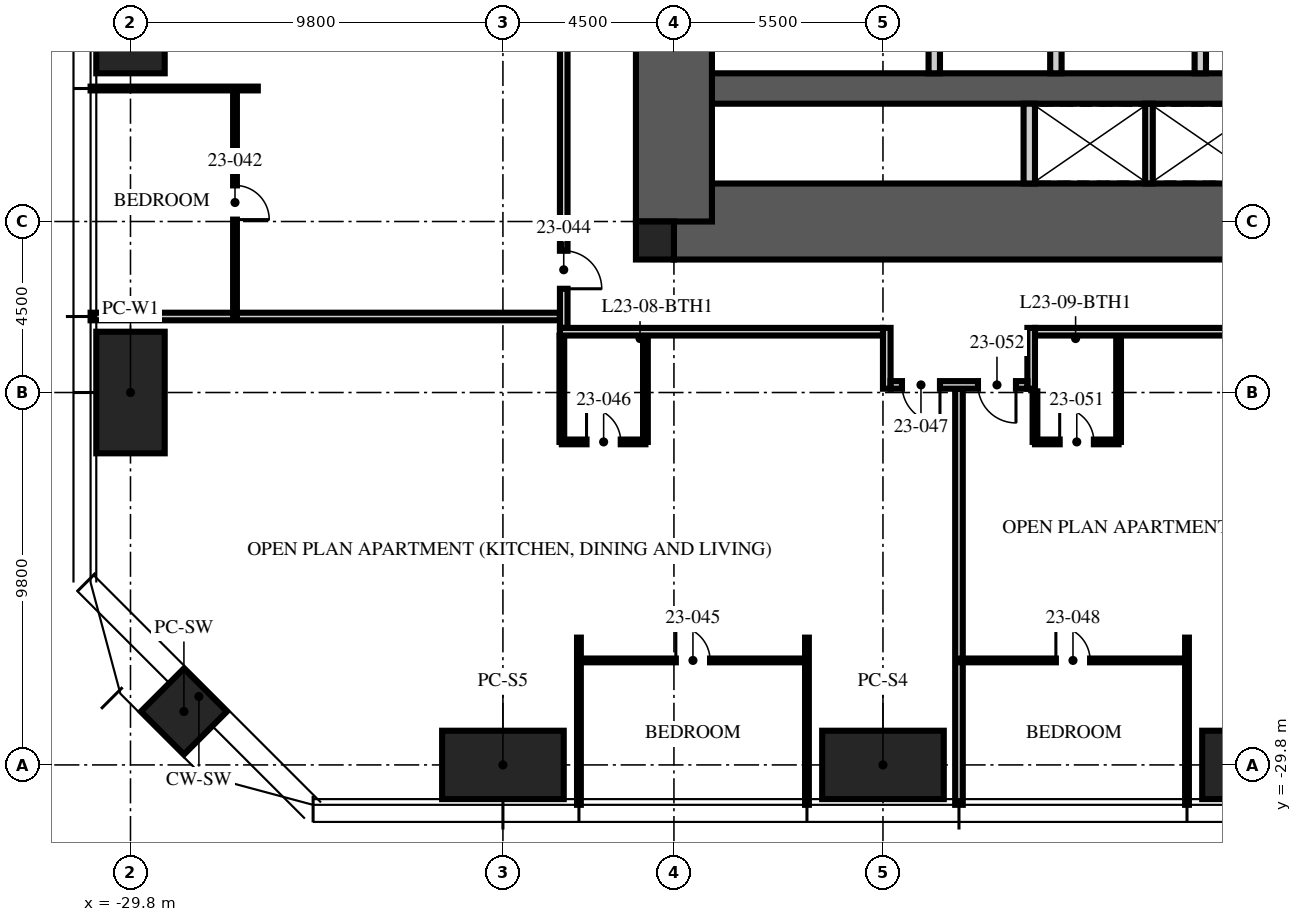
"""IFC4 building model, lengths in metres.
Left out: names, types, materials, properties, quantities, classifications, styles, units other than length and angle.
Written with IfcOpenShell. Run it as: python <this file> out.ifc"""

import sys

from ifc_helpers import new_model, si_unit, direction, frame, frame_2d, origin, origin_2d, place, context, subcontext, project, spatial, rectangle, hollow_rectangle, extrude, element, fill, save


model = new_model("IFC4")
c1 = context("Model", 3, precision=1e-05, world=origin(), true_north=direction((0.0, 1.0)))
c2 = subcontext(c1, "Body", "Model", "MODEL_VIEW")
j1 = project(units=[si_unit("LENGTHUNIT", "METRE"), si_unit("PLANEANGLEUNIT", "RADIAN")], contexts=[c1])
p1 = place(None, origin())
s1 = spatial("IfcSite", under=j1, at=p1, CompositionType="ELEMENT")
p2 = place(p1, origin())
s2 = spatial("IfcBuilding", under=s1, at=p2, CompositionType="ELEMENT")
p3 = place(p2, frame((0.0, 0.0, 92.25)))
s3 = spatial("IfcBuildingStorey", under=s2, at=p3, CompositionType="ELEMENT", Elevation=92.25)
p4 = place(p3, frame((-15.5, -15.5, -0.25), z_axis=(0.0, 0.0, 1.0), x_axis=(1.0, 0.0, 0.0)))
e1 = element("IfcWall", 1, at=p4, inside=s3, PredefinedType="SHEAR", context=c2, shape_type="SweptSolid", body=[
    extrude(rectangle(XDim=31.0, YDim=2.0, at=frame_2d((15.5, 0.0))), origin(), (0.0, 0.0, 1.0), 3.75),
])
p5 = place(p3, frame((-15.5, -12.0, -0.25), z_axis=(0.0, 0.0, 1.0), x_axis=(1.0, 0.0, 0.0)))
e2 = element("IfcWall", 2, at=p5, inside=s3, PredefinedType="SHEAR", context=c2, shape_type="SweptSolid", body=[
    extrude(rectangle(XDim=31.0, YDim=0.8, at=frame_2d((15.5, 0.0))), origin(), (0.0, 0.0, 1.0), 3.75),
])
p6 = place(p3, frame((-15.5, -15.5, -0.25), z_axis=(0.0, 0.0, 1.0), x_axis=(0.0, 1.0, 0.0)))
e3 = element("IfcWall", 3, at=p6, inside=s3, PredefinedType="SHEAR", context=c2, shape_type="SweptSolid", body=[
    extrude(rectangle(XDim=31.0, YDim=2.0, at=frame_2d((15.5, 0.0))), origin(), (0.0, 0.0, 1.0), 3.75),
])
p7 = place(p6, frame((6.5, 0.0, 0.25)))
e4 = element("IfcOpeningElement", 4, at=p7, cuts=e3, PredefinedType="OPENING", context=c2, shape_type="SweptSolid", body=[
    extrude(rectangle(XDim=1.2, YDim=2.1, at=frame_2d((0.6, 1.05))), frame((0.0, 1.01, 0.0), z_axis=(0.0, -1.0, 0.0), x_axis=(1.0, 0.0, 0.0)), (0.0, 0.0, 1.0), 2.02),
])
p8 = place(p6, frame((23.0, 0.0, 0.25)))
e5 = element("IfcOpeningElement", 5, at=p8, cuts=e3, PredefinedType="OPENING", context=c2, shape_type="SweptSolid", body=[
    extrude(rectangle(XDim=1.8, YDim=2.1, at=frame_2d((0.9, 1.05))), frame((0.0, 1.01, 0.0), z_axis=(0.0, -1.0, 0.0), x_axis=(1.0, 0.0, 0.0)), (0.0, 0.0, 1.0), 2.02),
])
p9 = place(p3, frame((-16.0, -16.0, -0.25), z_axis=(0.0, 0.0, 1.0), x_axis=(1.0, 0.0, 0.0)))
e6 = element("IfcColumn", 6, at=p9, inside=s3, PredefinedType="COLUMN", context=c2, shape_type="SweptSolid", body=[
    extrude(rectangle(XDim=1.0, YDim=1.0, at=origin_2d()), origin(), (0.0, 0.0, 1.0), 3.75),
])
for number, where, z_axis, x_axis in (
    (7, (0.0, -29.8, 0.0), (0.0, 0.0, 1.0), (1.0, 0.0, 0.0)),
    (8, (-10.0, -29.8, 0.0), (0.0, 0.0, 1.0), (1.0, 0.0, 0.0)),
    (9, (-20.0, -29.8, 0.0), (0.0, 0.0, 1.0), (1.0, 0.0, 0.0)),
    (10, (-29.8, -20.0, 0.0), (0.0, 0.0, 1.0), (0.0, 1.0, 0.0)),
    (11, (-29.8, -10.0, 0.0), (0.0, 0.0, 1.0), (0.0, 1.0, 0.0)),
):
    element("IfcColumn", number, at=place(p3, frame(where, z_axis=z_axis, x_axis=x_axis)), inside=s3, PredefinedType="COLUMN", context=c2, shape_type="SweptSolid", body=[
        extrude(hollow_rectangle(XDim=3.2, YDim=1.8, WallThickness=0.2, at=origin_2d()), origin(), (0.0, 0.0, 1.0), 3.75),
    ])
p10 = place(p3, frame((-28.394, -28.394, 0.0), z_axis=(0.0, 0.0, 1.0), x_axis=(0.707106781187, -0.707106781187, 0.0)))
e12 = element("IfcColumn", 12, at=p10, inside=s3, PredefinedType="COLUMN", context=c2, shape_type="SweptSolid", body=[
    extrude(hollow_rectangle(XDim=1.6, YDim=1.6, WallThickness=0.1, at=origin_2d()), origin(), (0.0, 0.0, 1.0), 3.75),
])
p11 = place(p3, frame((-8.65, -11.6, 0.0), z_axis=(0.0, 0.0, 1.0), x_axis=(0.0, 1.0, 0.0)))
e13 = element("IfcWall", 13, at=p11, inside=s3, PredefinedType="PARTITIONING", context=c2, shape_type="SweptSolid", body=[
    extrude(rectangle(XDim=6.7, YDim=0.3, at=frame_2d((3.35, 0.0))), origin(), (0.0, 0.0, 1.0), 3.5),
])
p12 = place(p11, frame((2.85, 0.0, 0.0)))
e14 = element("IfcOpeningElement", 14, at=p12, cuts=e13, PredefinedType="OPENING", context=c2, shape_type="SweptSolid", body=[
    extrude(rectangle(XDim=1.1, YDim=2.1, at=frame_2d((0.55, 1.05))), frame((0.0, 0.16, 0.0), z_axis=(0.0, -1.0, 0.0), x_axis=(1.0, 0.0, 0.0)), (0.0, 0.0, 1.0), 0.32),
])
for number, where, z_axis, x_axis in (
    (15, (-5.45, -11.6, 0.0), (0.0, 0.0, 1.0), (0.0, 1.0, 0.0)),
    (16, (-1.65, -11.6, 0.0), (0.0, 0.0, 1.0), (0.0, 1.0, 0.0)),
):
    element("IfcWall", number, at=place(p3, frame(where, z_axis=z_axis, x_axis=x_axis)), inside=s3, PredefinedType="PARTITIONING", context=c2, shape_type="SweptSolid", body=[
        extrude(rectangle(XDim=4.8, YDim=0.3, at=frame_2d((2.4, 0.0))), origin(), (0.0, 0.0, 1.0), 3.5),
    ])
p13 = place(p3, frame((-6.15, -14.5, 0.0), z_axis=(0.0, 0.0, 1.0), x_axis=(0.0, 1.0, 0.0)))
e17 = element("IfcWall", 17, at=p13, inside=s3, PredefinedType="PARTITIONING", context=c2, shape_type="SweptSolid", body=[
    extrude(rectangle(XDim=2.1, YDim=0.3, at=frame_2d((1.05, 0.0))), origin(), (0.0, 0.0, 1.0), 3.5),
])
p14 = place(p3, frame((-3.0, -14.5, 0.0), z_axis=(0.0, 0.0, 1.0), x_axis=(0.0, 1.0, 0.0)))
e18 = element("IfcWall", 18, at=p14, inside=s3, PredefinedType="PARTITIONING", context=c2, shape_type="SweptSolid", body=[
    extrude(rectangle(XDim=2.1, YDim=0.2, at=frame_2d((1.05, 0.0))), origin(), (0.0, 0.0, 1.0), 3.5),
])
p15 = place(p3, frame((-26.45, -12.0, 0.0), z_axis=(0.0, 0.0, 1.0), x_axis=(-1.0, 0.0, 0.0)))
e19 = element("IfcWall", 19, at=p15, inside=s3, PredefinedType="PARTITIONING", context=c2, shape_type="SweptSolid", body=[
    extrude(rectangle(XDim=4.4, YDim=0.1, at=frame_2d((2.2, 0.0))), origin(), (0.0, 0.0, 1.0), 2.61),
])
p16 = place(p3, frame((-18.5, -18.0, 0.0), z_axis=(0.0, 0.0, 1.0), x_axis=(-1.0, 0.0, 0.0)))
e20 = element("IfcWall", 20, at=p16, inside=s3, PredefinedType="PARTITIONING", context=c2, shape_type="SweptSolid", body=[
    extrude(rectangle(XDim=12.35, YDim=0.2, at=frame_2d((6.175, 0.0))), origin(), (0.0, 0.0, 1.0), 2.3),
])
for number, where, z_axis, x_axis in (
    (21, (-18.0, -26.45, 0.0), (0.0, 0.0, 1.0), (0.0, -1.0, 0.0)),
    (22, (-12.0, -26.45, 0.0), (0.0, 0.0, 1.0), (0.0, -1.0, 0.0)),
):
    element("IfcWall", number, at=place(p3, frame(where, z_axis=z_axis, x_axis=x_axis)), inside=s3, PredefinedType="PARTITIONING", context=c2, shape_type="SweptSolid", body=[
        extrude(rectangle(XDim=4.4, YDim=0.1, at=frame_2d((2.2, 0.0))), origin(), (0.0, 0.0, 1.0), 2.61),
    ])
p17 = place(p3, frame((-8.0, -19.9, 0.0), z_axis=(0.0, 0.0, 1.0), x_axis=(0.0, -1.0, 0.0)))
e23 = element("IfcWall", 23, at=p17, inside=s3, PredefinedType="PARTITIONING", context=c2, shape_type="SweptSolid", body=[
    extrude(rectangle(XDim=10.95, YDim=0.2, at=frame_2d((5.475, 0.0))), origin(), (0.0, 0.0, 1.0), 2.61),
])
p18 = place(p3, frame((-2.0, -26.45, 0.0), z_axis=(0.0, 0.0, 1.0), x_axis=(0.0, -1.0, 0.0)))
e24 = element("IfcWall", 24, at=p18, inside=s3, PredefinedType="PARTITIONING", context=c2, shape_type="SweptSolid", body=[
    extrude(rectangle(XDim=4.4, YDim=0.1, at=frame_2d((2.2, 0.0))), origin(), (0.0, 0.0, 1.0), 2.61),
])
p19 = place(p3, frame((-27.05, -12.0, 0.0), z_axis=(0.0, 0.0, 1.0), x_axis=(0.0, -1.0, 0.0)))
e25 = element("IfcWall", 25, at=p19, inside=s3, PredefinedType="PARTITIONING", context=c2, shape_type="SweptSolid", body=[
    extrude(rectangle(XDim=6.0, YDim=0.1, at=frame_2d((3.0, 0.0))), origin(), (0.0, 0.0, 1.0), 2.6),
])
p20 = place(p19, frame((2.55, 0.0, 0.0)))
e26 = element("IfcOpeningElement", 26, at=p20, cuts=e25, PredefinedType="OPENING", context=c2, shape_type="SweptSolid", body=[
    extrude(rectangle(XDim=0.9, YDim=2.1, at=frame_2d((0.45, 1.05))), frame((0.0, 0.06, 0.0), z_axis=(0.0, -1.0, 0.0), x_axis=(1.0, 0.0, 0.0)), (0.0, 0.0, 1.0), 0.12),
])
p21 = place(p3, frame((-18.0, -27.05, 0.0), z_axis=(0.0, 0.0, 1.0), x_axis=(1.0, 0.0, 0.0)))
e27 = element("IfcWall", 27, at=p21, inside=s3, PredefinedType="PARTITIONING", context=c2, shape_type="SweptSolid", body=[
    extrude(rectangle(XDim=6.0, YDim=0.1, at=frame_2d((3.0, 0.0))), origin(), (0.0, 0.0, 1.0), 2.6),
])
p22 = place(p21, frame((2.55, 0.0, 0.0)))
e28 = element("IfcOpeningElement", 28, at=p22, cuts=e27, PredefinedType="OPENING", context=c2, shape_type="SweptSolid", body=[
    extrude(rectangle(XDim=0.9, YDim=2.1, at=frame_2d((0.45, 1.05))), frame((0.0, 0.06, 0.0), z_axis=(0.0, -1.0, 0.0), x_axis=(1.0, 0.0, 0.0)), (0.0, 0.0, 1.0), 0.12),
])
p23 = place(p3, frame((-18.45, -21.3, 0.0), z_axis=(0.0, 0.0, 1.0), x_axis=(1.0, 0.0, 0.0)))
e29 = element("IfcWall", 29, at=p23, inside=s3, PredefinedType="PARTITIONING", context=c2, shape_type="SweptSolid", body=[
    extrude(rectangle(XDim=2.2, YDim=0.125, at=frame_2d((1.1, 0.0))), origin(), (0.0, 0.0, 1.0), 3.5),
])
p24 = place(p23, frame((0.65, 0.0, 0.0)))
e30 = element("IfcOpeningElement", 30, at=p24, cuts=e29, PredefinedType="OPENING", context=c2, shape_type="SweptSolid", body=[
    extrude(rectangle(XDim=0.9, YDim=2.1, at=frame_2d((0.45, 1.05))), frame((0.0, 0.073, 0.0), z_axis=(0.0, -1.0, 0.0), x_axis=(1.0, 0.0, 0.0)), (0.0, 0.0, 1.0), 0.145),
])
p25 = place(p3, frame((-18.45, -18.5, 0.0), z_axis=(0.0, 0.0, 1.0), x_axis=(0.0, -1.0, 0.0)))
e31 = element("IfcWall", 31, at=p25, inside=s3, PredefinedType="PARTITIONING", context=c2, shape_type="SweptSolid", body=[
    extrude(rectangle(XDim=2.8, YDim=0.125, at=frame_2d((1.4, 0.0))), origin(), (0.0, 0.0, 1.0), 2.3),
])
p26 = place(p3, frame((-16.25, -18.5, 0.0), z_axis=(0.0, 0.0, 1.0), x_axis=(0.0, -1.0, 0.0)))
e32 = element("IfcWall", 32, at=p26, inside=s3, PredefinedType="PARTITIONING", context=c2, shape_type="SweptSolid", body=[
    extrude(rectangle(XDim=2.8, YDim=0.125, at=frame_2d((1.4, 0.0))), origin(), (0.0, 0.0, 1.0), 3.5),
])
p27 = place(p3, frame((-8.0, -27.05, 0.0), z_axis=(0.0, 0.0, 1.0), x_axis=(1.0, 0.0, 0.0)))
e33 = element("IfcWall", 33, at=p27, inside=s3, PredefinedType="PARTITIONING", context=c2, shape_type="SweptSolid", body=[
    extrude(rectangle(XDim=6.0, YDim=0.1, at=frame_2d((3.0, 0.0))), origin(), (0.0, 0.0, 1.0), 2.6),
])
p28 = place(p27, frame((2.55, 0.0, 0.0)))
e34 = element("IfcOpeningElement", 34, at=p28, cuts=e33, PredefinedType="OPENING", context=c2, shape_type="SweptSolid", body=[
    extrude(rectangle(XDim=0.9, YDim=2.1, at=frame_2d((0.45, 1.05))), frame((0.0, 0.06, 0.0), z_axis=(0.0, -1.0, 0.0), x_axis=(1.0, 0.0, 0.0)), (0.0, 0.0, 1.0), 0.12),
])
p29 = place(p3, frame((-6.0, -21.3, 0.0), z_axis=(0.0, 0.0, 1.0), x_axis=(1.0, 0.0, 0.0)))
e35 = element("IfcWall", 35, at=p29, inside=s3, PredefinedType="PARTITIONING", context=c2, shape_type="SweptSolid", body=[
    extrude(rectangle(XDim=2.2, YDim=0.125, at=frame_2d((1.1, 0.0))), origin(), (0.0, 0.0, 1.0), 2.6),
])
p30 = place(p29, frame((0.65, 0.0, 0.0)))
e36 = element("IfcOpeningElement", 36, at=p30, cuts=e35, PredefinedType="OPENING", context=c2, shape_type="SweptSolid", body=[
    extrude(rectangle(XDim=0.9, YDim=2.1, at=frame_2d((0.45, 1.05))), frame((0.0, 0.073, 0.0), z_axis=(0.0, -1.0, 0.0), x_axis=(1.0, 0.0, 0.0)), (0.0, 0.0, 1.0), 0.145),
])
p31 = place(p3, frame((-6.0, -19.97, 0.0), z_axis=(0.0, 0.0, 1.0), x_axis=(0.0, -1.0, 0.0)))
e37 = element("IfcWall", 37, at=p31, inside=s3, PredefinedType="PARTITIONING", context=c2, shape_type="SweptSolid", body=[
    extrude(rectangle(XDim=1.33, YDim=0.125, at=frame_2d((0.665, 0.0))), origin(), (0.0, 0.0, 1.0), 3.5),
])
p32 = place(p3, frame((-3.8, -18.5, 0.0), z_axis=(0.0, 0.0, 1.0), x_axis=(0.0, -1.0, 0.0)))
e38 = element("IfcWall", 38, at=p32, inside=s3, PredefinedType="PARTITIONING", context=c2, shape_type="SweptSolid", body=[
    extrude(rectangle(XDim=2.8, YDim=0.125, at=frame_2d((1.4, 0.0))), origin(), (0.0, 0.0, 1.0), 3.5),
])
p33 = place(p3, frame((-18.4, 6.0, 0.0), z_axis=(0.0, 0.0, 1.0), x_axis=(0.0, -1.0, 0.0)))
e39 = element("IfcWall", 39, at=p33, inside=s3, PredefinedType="PARTITIONING", context=c2, shape_type="SweptSolid", body=[
    extrude(rectangle(XDim=24.3, YDim=0.2, at=frame_2d((12.15, 0.0))), origin(), (0.0, 0.0, 1.0), 2.3),
])
p34 = place(p33, frame((22.27, 0.0, 0.0)))
e40 = element("IfcOpeningElement", 40, at=p34, cuts=e39, PredefinedType="OPENING", context=c2, shape_type="SweptSolid", body=[
    extrude(rectangle(XDim=1.0, YDim=2.2, at=frame_2d((0.5, 1.1))), frame((0.0, 0.11, 0.0), z_axis=(0.0, -1.0, 0.0), x_axis=(1.0, 0.0, 0.0)), (0.0, 0.0, 1.0), 0.22),
])
p35 = place(p3, frame((18.5, -18.4, 0.0), z_axis=(0.0, 0.0, 1.0), x_axis=(-1.0, 0.0, 0.0)))
e41 = element("IfcWall", 41, at=p35, inside=s3, PredefinedType="PARTITIONING", context=c2, shape_type="SweptSolid", body=[
    extrude(rectangle(XDim=24.5, YDim=0.2, at=frame_2d((12.25, 0.0))), origin(), (0.0, 0.0, 1.0), 2.3),
])
p36 = place(p35, frame((1.23, 0.0, 0.0)))
e42 = element("IfcOpeningElement", 42, at=p36, cuts=e41, PredefinedType="OPENING", context=c2, shape_type="SweptSolid", body=[
    extrude(rectangle(XDim=1.0, YDim=2.2, at=frame_2d((0.5, 1.1))), frame((0.0, 0.11, 0.0), z_axis=(0.0, -1.0, 0.0), x_axis=(1.0, 0.0, 0.0)), (0.0, 0.0, 1.0), 0.22),
])
p37 = place(p3, frame((-6.1, -18.3, 0.0), z_axis=(0.0, 0.0, 1.0), x_axis=(0.0, -1.0, 0.0)))
e43 = element("IfcWall", 43, at=p37, inside=s3, PredefinedType="PARTITIONING", context=c2, shape_type="SweptSolid", body=[
    extrude(rectangle(XDim=1.6, YDim=0.2, at=frame_2d((0.8, 0.0))), origin(), (0.0, 0.0, 1.0), 3.5),
])
p38 = place(p3, frame((-9.9, -18.3, 0.0), z_axis=(0.0, 0.0, 1.0), x_axis=(0.0, -1.0, 0.0)))
e44 = element("IfcWall", 44, at=p38, inside=s3, PredefinedType="PARTITIONING", context=c2, shape_type="SweptSolid", body=[
    extrude(rectangle(XDim=1.6, YDim=0.2, at=frame_2d((0.8, 0.0))), origin(), (0.0, 0.0, 1.0), 2.492),
])
p39 = place(p3, frame((-6.2, -19.8, 0.0), z_axis=(0.0, 0.0, 1.0), x_axis=(-1.0, 0.0, 0.0)))
e45 = element("IfcWall", 45, at=p39, inside=s3, PredefinedType="PARTITIONING", context=c2, shape_type="SweptSolid", body=[
    extrude(rectangle(XDim=3.6, YDim=0.2, at=frame_2d((1.8, 0.0))), origin(), (0.0, 0.0, 1.0), 3.5),
])
p40 = place(p39, frame((2.3, 0.0, 0.0)))
e46 = element("IfcOpeningElement", 46, at=p40, cuts=e45, PredefinedType="OPENING", context=c2, shape_type="SweptSolid", body=[
    extrude(rectangle(XDim=1.0, YDim=2.2, at=frame_2d((0.5, 1.1))), frame((0.0, 0.11, 0.0), z_axis=(0.0, -1.0, 0.0), x_axis=(1.0, 0.0, 0.0)), (0.0, 0.0, 1.0), 0.22),
])
p41 = place(p39, frame((0.3, 0.0, 0.0)))
e47 = element("IfcOpeningElement", 47, at=p41, cuts=e45, PredefinedType="OPENING", context=c2, shape_type="SweptSolid", body=[
    extrude(rectangle(XDim=1.0, YDim=2.2, at=frame_2d((0.5, 1.1))), frame((0.0, 0.11, 0.0), z_axis=(0.0, -1.0, 0.0), x_axis=(1.0, 0.0, 0.0)), (0.0, 0.0, 1.0), 0.22),
])
p42 = place(p3, frame((-10.0, -18.4, 0.0), z_axis=(0.0, 0.0, 1.0), x_axis=(-1.0, 0.0, 0.0)))
e48 = element("IfcWall", 48, at=p42, inside=s3, PredefinedType="PARTITIONING", context=c2, shape_type="SweptSolid", body=[
    extrude(rectangle(XDim=8.5, YDim=0.2, at=frame_2d((4.25, 0.0))), origin(), (0.0, 0.0, 1.0), 2.3),
])
p43 = place(p20, origin())
e49 = element("IfcDoor", 49, at=p43, inside=s3, OperationType="SINGLE_SWING_RIGHT", PredefinedType="DOOR", context=c2, shape_type="SweptSolid", body=[
    extrude(rectangle(XDim=0.9, YDim=2.1, at=frame_2d((0.45, 1.05))), frame((0.0, 0.025, 0.0), z_axis=(0.0, -1.0, 0.0), x_axis=(1.0, 0.0, 0.0)), (0.0, 0.0, 1.0), 0.05),
])
fill(e26, e49)
p44 = place(p34, origin())
e50 = element("IfcDoor", 50, at=p44, inside=s3, OperationType="SINGLE_SWING_RIGHT", PredefinedType="DOOR", context=c2, shape_type="SweptSolid", body=[
    extrude(rectangle(XDim=1.0, YDim=2.2, at=frame_2d((0.5, 1.1))), frame((0.0, 0.025, 0.0), z_axis=(0.0, -1.0, 0.0), x_axis=(1.0, 0.0, 0.0)), (0.0, 0.0, 1.0), 0.05),
])
fill(e40, e50)
p45 = place(p22, origin())
e51 = element("IfcDoor", 51, at=p45, inside=s3, OperationType="SINGLE_SWING_LEFT", PredefinedType="DOOR", context=c2, shape_type="SweptSolid", body=[
    extrude(rectangle(XDim=0.9, YDim=2.1, at=frame_2d((0.45, 1.05))), frame((0.0, 0.025, 0.0), z_axis=(0.0, -1.0, 0.0), x_axis=(1.0, 0.0, 0.0)), (0.0, 0.0, 1.0), 0.05),
])
fill(e28, e51)
p46 = place(p24, origin())
e52 = element("IfcDoor", 52, at=p46, inside=s3, OperationType="SINGLE_SWING_LEFT", PredefinedType="DOOR", context=c2, shape_type="SweptSolid", body=[
    extrude(rectangle(XDim=0.9, YDim=2.1, at=frame_2d((0.45, 1.05))), frame((0.0, 0.025, 0.0), z_axis=(0.0, -1.0, 0.0), x_axis=(1.0, 0.0, 0.0)), (0.0, 0.0, 1.0), 0.05),
])
fill(e30, e52)
p47 = place(p40, origin())
e53 = element("IfcDoor", 53, at=p47, inside=s3, OperationType="SINGLE_SWING_LEFT", PredefinedType="DOOR", context=c2, shape_type="SweptSolid", body=[
    extrude(rectangle(XDim=1.0, YDim=2.2, at=frame_2d((0.5, 1.1))), frame((0.0, 0.025, 0.0), z_axis=(0.0, -1.0, 0.0), x_axis=(1.0, 0.0, 0.0)), (0.0, 0.0, 1.0), 0.05),
])
fill(e46, e53)
p48 = place(p28, origin())
e54 = element("IfcDoor", 54, at=p48, inside=s3, OperationType="SINGLE_SWING_LEFT", PredefinedType="DOOR", context=c2, shape_type="SweptSolid", body=[
    extrude(rectangle(XDim=0.9, YDim=2.1, at=frame_2d((0.45, 1.05))), frame((0.0, 0.025, 0.0), z_axis=(0.0, -1.0, 0.0), x_axis=(1.0, 0.0, 0.0)), (0.0, 0.0, 1.0), 0.05),
])
fill(e34, e54)
p49 = place(p30, origin())
e55 = element("IfcDoor", 55, at=p49, inside=s3, OperationType="SINGLE_SWING_LEFT", PredefinedType="DOOR", context=c2, shape_type="SweptSolid", body=[
    extrude(rectangle(XDim=0.9, YDim=2.1, at=frame_2d((0.45, 1.05))), frame((0.0, 0.025, 0.0), z_axis=(0.0, -1.0, 0.0), x_axis=(1.0, 0.0, 0.0)), (0.0, 0.0, 1.0), 0.05),
])
fill(e36, e55)
p50 = place(p41, origin())
e56 = element("IfcDoor", 56, at=p50, inside=s3, OperationType="SINGLE_SWING_LEFT", PredefinedType="DOOR", context=c2, shape_type="SweptSolid", body=[
    extrude(rectangle(XDim=1.0, YDim=2.2, at=frame_2d((0.5, 1.1))), frame((0.0, 0.025, 0.0), z_axis=(0.0, -1.0, 0.0), x_axis=(1.0, 0.0, 0.0)), (0.0, 0.0, 1.0), 0.05),
])
fill(e47, e56)
save(model, sys.argv[1])
